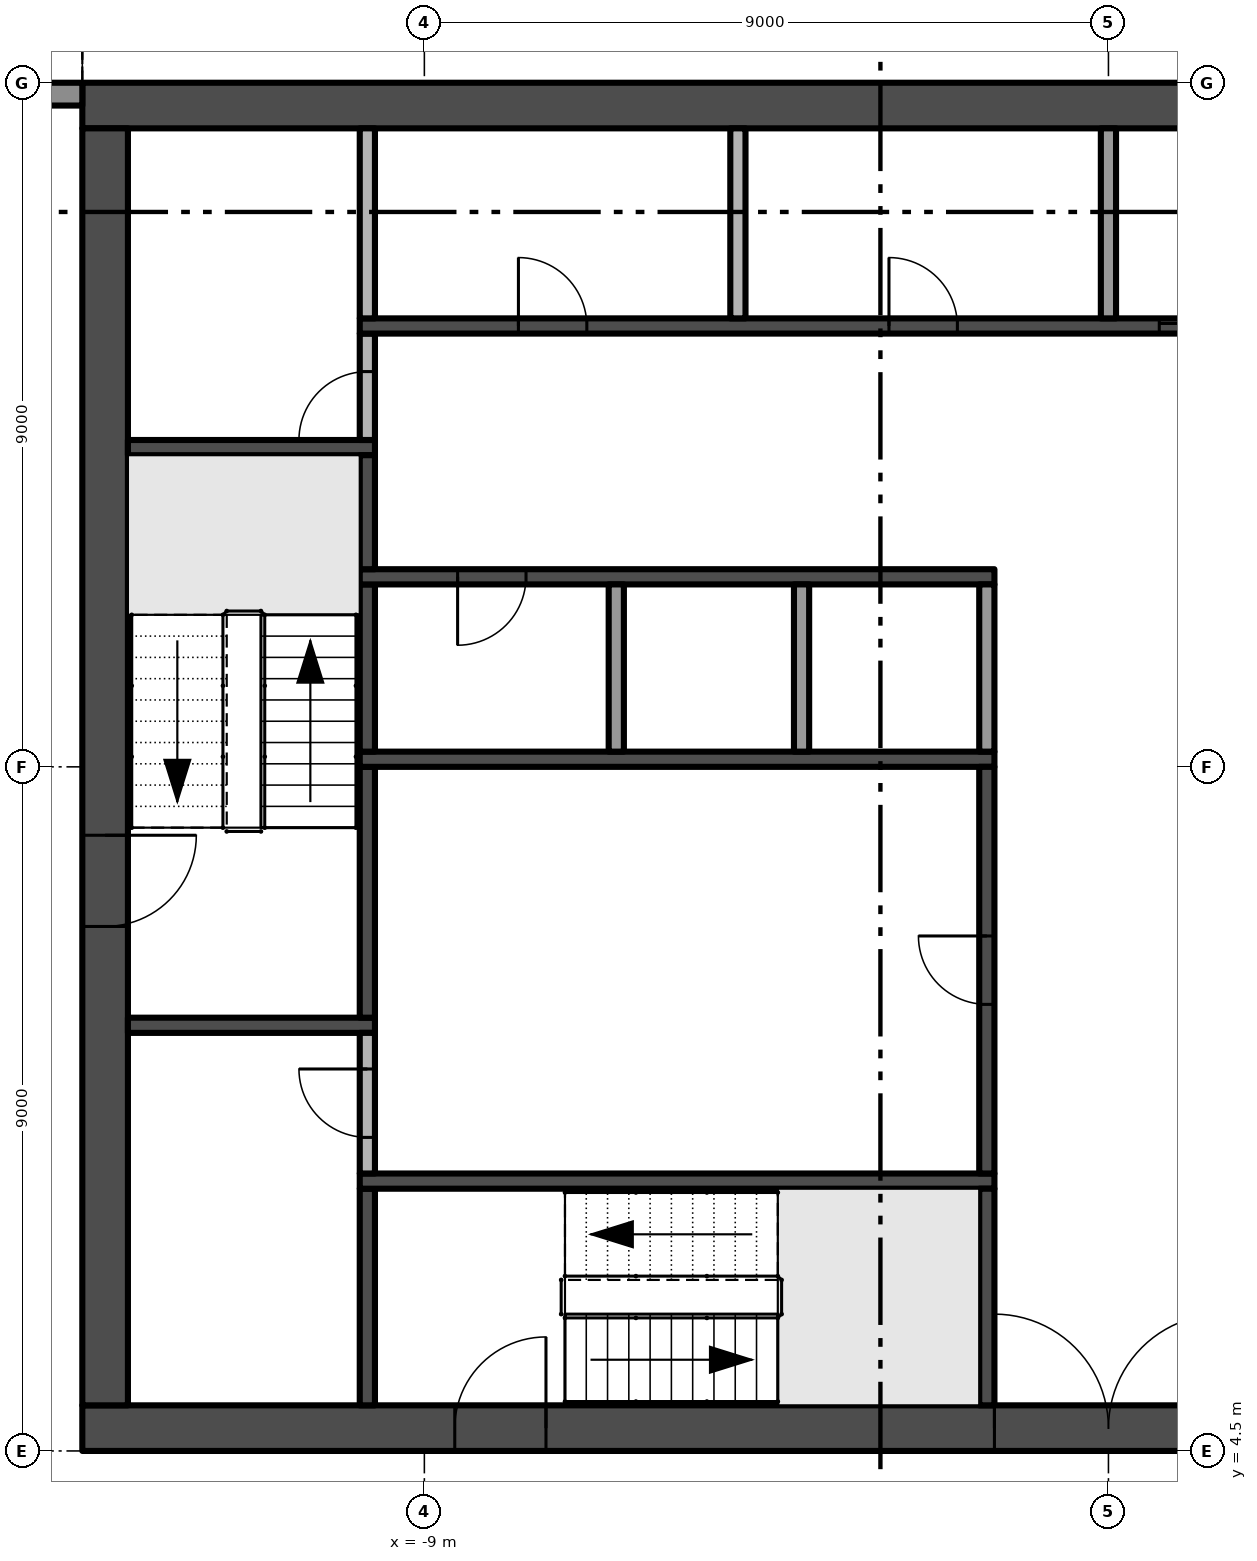
"""IFC4 building model, lengths in metres.
Left out: names, types, materials, properties, quantities, classifications, styles, units other than length and angle.
Written with IfcOpenShell. Run it as: python <this file> out.ifc"""

import sys

from ifc_helpers import new_model, si_unit, direction, frame, frame_2d, origin, place, context, subcontext, project, spatial, polyline, rectangle, outline, extrude, element, fill, save


model = new_model("IFC4")
c1 = context("Model", 3, precision=1e-05, world=origin(), true_north=direction((0.0, 1.0)))
c2 = subcontext(c1, "Body", "Model", "MODEL_VIEW")
j1 = project(units=[si_unit("LENGTHUNIT", "METRE"), si_unit("PLANEANGLEUNIT", "RADIAN")], contexts=[c1])
p1 = place(None, origin())
s1 = spatial("IfcSite", under=j1, at=p1, CompositionType="ELEMENT")
p2 = place(p1, origin())
s2 = spatial("IfcBuilding", under=s1, at=p2, CompositionType="ELEMENT")
p3 = place(p2, frame((0.0, 0.0, 195.8)))
s3 = spatial("IfcBuildingStorey", under=s2, at=p3, CompositionType="ELEMENT", Elevation=195.8)
p4 = place(p3, frame((-13.5, 4.8, -0.3), z_axis=(0.0, 0.0, 1.0), x_axis=(1.0, 0.0, 0.0)))
e1 = element("IfcWall", 1, at=p4, inside=s3, PredefinedType="SHEAR", context=c2, shape_type="SweptSolid", body=[
    extrude(rectangle(XDim=27.0, YDim=0.6, at=frame_2d((13.5, 0.0))), origin(), (0.0, 0.0, 1.0), 3.8),
])
p5 = place(p4, frame((12.0, 0.0, 0.3)))
e2 = element("IfcOpeningElement", 2, at=p5, cuts=e1, PredefinedType="OPENING", context=c2, shape_type="SweptSolid", body=[
    extrude(rectangle(XDim=3.0, YDim=2.4, at=frame_2d((1.5, 1.2))), frame((0.0, 0.31, 0.0), z_axis=(0.0, -1.0, 0.0), x_axis=(1.0, 0.0, 0.0)), (0.0, 0.0, 1.0), 0.62),
])
p6 = place(p4, frame((4.9, 0.0, 0.3)))
e3 = element("IfcOpeningElement", 3, at=p6, cuts=e1, PredefinedType="OPENING", context=c2, shape_type="SweptSolid", body=[
    extrude(rectangle(XDim=1.2, YDim=2.2, at=frame_2d((0.6, 1.1))), frame((0.0, 0.31, 0.0), z_axis=(0.0, -1.0, 0.0), x_axis=(1.0, 0.0, 0.0)), (0.0, 0.0, 1.0), 0.62),
])
p7 = place(p4, frame((20.75, 0.0, 0.3)))
e4 = element("IfcOpeningElement", 4, at=p7, cuts=e1, PredefinedType="OPENING", context=c2, shape_type="SweptSolid", body=[
    extrude(rectangle(XDim=1.5, YDim=2.2, at=frame_2d((0.75, 1.1))), frame((0.0, 0.31, 0.0), z_axis=(0.0, -1.0, 0.0), x_axis=(1.0, 0.0, 0.0)), (0.0, 0.0, 1.0), 0.62),
])
p8 = place(p4, frame((17.4, 0.0, 0.3)))
e5 = element("IfcOpeningElement", 5, at=p8, cuts=e1, PredefinedType="OPENING", context=c2, shape_type="SweptSolid", body=[
    extrude(rectangle(XDim=1.2, YDim=2.2, at=frame_2d((0.6, 1.1))), frame((0.0, 0.31, 0.0), z_axis=(0.0, -1.0, 0.0), x_axis=(1.0, 0.0, 0.0)), (0.0, 0.0, 1.0), 0.62),
])
p9 = place(p3, frame((13.5, 22.2, -0.3), z_axis=(0.0, 0.0, 1.0), x_axis=(-1.0, 0.0, 0.0)))
e6 = element("IfcWall", 6, at=p9, inside=s3, PredefinedType="SHEAR", context=c2, shape_type="SweptSolid", body=[
    extrude(rectangle(XDim=27.0, YDim=0.6, at=frame_2d((13.5, 0.0))), origin(), (0.0, 0.0, 1.0), 3.8),
])
p10 = place(p3, frame((-13.2, 21.9, -0.3), z_axis=(0.0, 0.0, 1.0), x_axis=(0.0, -1.0, 0.0)))
e7 = element("IfcWall", 7, at=p10, inside=s3, PredefinedType="SHEAR", context=c2, shape_type="SweptSolid", body=[
    extrude(rectangle(XDim=16.8, YDim=0.6, at=frame_2d((8.4, 0.0))), origin(), (0.0, 0.0, 1.0), 3.8),
])
p11 = place(p10, frame((9.3, 0.0, 0.3)))
e8 = element("IfcOpeningElement", 8, at=p11, cuts=e7, PredefinedType="OPENING", context=c2, shape_type="SweptSolid", body=[
    extrude(rectangle(XDim=1.2, YDim=2.2, at=frame_2d((0.6, 1.1))), frame((0.0, 0.31, 0.0), z_axis=(0.0, -1.0, 0.0), x_axis=(1.0, 0.0, 0.0)), (0.0, 0.0, 1.0), 0.62),
])
p12 = place(p3, frame((-17.475, 22.35, 0.0), z_axis=(0.0, 0.0, 1.0), x_axis=(1.0, 0.0, 0.0)))
e9 = element("IfcWall", 9, at=p12, inside=s3, PredefinedType="SOLIDWALL", context=c2, shape_type="SweptSolid", body=[
    extrude(rectangle(XDim=3.975, YDim=0.3, at=frame_2d((1.988, 0.0))), origin(), (0.0, 0.0, 1.0), 3.5),
])
p13 = place(p12, frame((0.325, 0.0, 0.45)))
e10 = element("IfcOpeningElement", 10, at=p13, cuts=e9, PredefinedType="OPENING", context=c2, shape_type="SweptSolid", body=[
    extrude(rectangle(XDim=3.025, YDim=2.65, at=frame_2d((1.512, 1.325))), frame((0.0, 0.16, 0.0), z_axis=(0.0, -1.0, 0.0), x_axis=(1.0, 0.0, 0.0)), (0.0, 0.0, 1.0), 0.32),
])
p14 = place(p3, origin())
e11 = element("IfcWall", 11, at=p14, inside=s3, PredefinedType="USERDEFINED", context=c2, shape_type="SweptSolid", body=[
    extrude(outline(polyline([(-13.5, 24.3), (-15.0, 23.595), (-16.5, 23.159), (-17.25, 23.1), (-18.0, 23.159), (-19.5, 23.595), (-21.0, 24.3), (-22.5, 25.005), (-22.606, 24.779), (-21.106, 24.074), (-19.589, 23.36), (-18.045, 22.911), (-17.25, 22.849), (-16.455, 22.911), (-14.911, 23.36), (-13.394, 24.074), (-13.5, 24.3)])), origin(), (0.0, 0.0, 1.0), 0.9),
])
for number, where, z_axis, x_axis in (
    (12, (-12.9, 10.1, 0.0), (0.0, 0.0, 1.0), (1.0, 0.0, 0.0)),
    (13, (-12.9, 17.7, 0.0), (0.0, 0.0, 1.0), (1.0, 0.0, 0.0)),
):
    element("IfcWall", number, at=place(p3, frame(where, z_axis=z_axis, x_axis=x_axis)), inside=s3, PredefinedType="SHEAR", context=c2, shape_type="SweptSolid", body=[
        extrude(rectangle(XDim=3.25, YDim=0.2, at=frame_2d((1.625, 0.0))), origin(), (0.0, 0.0, 1.0), 3.5),
    ])
p15 = place(p3, frame((-9.75, 5.1, 0.0), z_axis=(0.0, 0.0, 1.0), x_axis=(0.0, 1.0, 0.0)))
e14 = element("IfcWall", 14, at=p15, inside=s3, PredefinedType="SHEAR", context=c2, shape_type="SweptSolid", body=[
    extrude(rectangle(XDim=2.85, YDim=0.2, at=frame_2d((1.425, 0.0))), origin(), (0.0, 0.0, 1.0), 3.5),
])
p16 = place(p3, frame((-9.85, 8.05, 0.0), z_axis=(0.0, 0.0, 1.0), x_axis=(1.0, 0.0, 0.0)))
e15 = element("IfcWall", 15, at=p16, inside=s3, PredefinedType="SHEAR", context=c2, shape_type="SweptSolid", body=[
    extrude(rectangle(XDim=8.35, YDim=0.2, at=frame_2d((4.175, 0.0))), origin(), (0.0, 0.0, 1.0), 3.5),
])
p17 = place(p3, frame((-9.75, 8.15, 0.0), z_axis=(0.0, 0.0, 1.0), x_axis=(0.0, 1.0, 0.0)))
e16 = element("IfcWall", 16, at=p17, inside=s3, PredefinedType="PARTITIONING", context=c2, shape_type="SweptSolid", body=[
    extrude(rectangle(XDim=1.85, YDim=0.2, at=frame_2d((0.925, 0.0))), origin(), (0.0, 0.0, 1.0), 3.5),
])
p18 = place(p17, frame((0.475, 0.0, 0.0)))
e17 = element("IfcOpeningElement", 17, at=p18, cuts=e16, PredefinedType="OPENING", context=c2, shape_type="SweptSolid", body=[
    extrude(rectangle(XDim=0.9, YDim=2.1, at=frame_2d((0.45, 1.05))), frame((0.0, 0.11, 0.0), z_axis=(0.0, -1.0, 0.0), x_axis=(1.0, 0.0, 0.0)), (0.0, 0.0, 1.0), 0.22),
])
p19 = place(p3, frame((-9.75, 10.2, 0.0), z_axis=(0.0, 0.0, 1.0), x_axis=(0.0, 1.0, 0.0)))
e18 = element("IfcWall", 18, at=p19, inside=s3, PredefinedType="SHEAR", context=c2, shape_type="SweptSolid", body=[
    extrude(rectangle(XDim=3.3, YDim=0.2, at=frame_2d((1.65, 0.0))), origin(), (0.0, 0.0, 1.0), 3.5),
])
p20 = place(p3, frame((-9.85, 13.6, 0.0), z_axis=(0.0, 0.0, 1.0), x_axis=(1.0, 0.0, 0.0)))
e19 = element("IfcWall", 19, at=p20, inside=s3, PredefinedType="SHEAR", context=c2, shape_type="SweptSolid", body=[
    extrude(rectangle(XDim=8.35, YDim=0.2, at=frame_2d((4.175, 0.0))), origin(), (0.0, 0.0, 1.0), 3.5),
])
p21 = place(p3, frame((-9.75, 13.7, 0.0), z_axis=(0.0, 0.0, 1.0), x_axis=(0.0, 1.0, 0.0)))
e20 = element("IfcWall", 20, at=p21, inside=s3, PredefinedType="SHEAR", context=c2, shape_type="SweptSolid", body=[
    extrude(rectangle(XDim=2.2, YDim=0.2, at=frame_2d((1.1, 0.0))), origin(), (0.0, 0.0, 1.0), 3.5),
])
p22 = place(p3, frame((-1.5, 16.0, 0.0), z_axis=(0.0, 0.0, 1.0), x_axis=(-1.0, 0.0, 0.0)))
e21 = element("IfcWall", 21, at=p22, inside=s3, PredefinedType="SHEAR", context=c2, shape_type="SweptSolid", body=[
    extrude(rectangle(XDim=8.35, YDim=0.2, at=frame_2d((4.175, 0.0))), origin(), (0.0, 0.0, 1.0), 3.5),
])
p23 = place(p22, frame((6.162, 0.0, 0.0)))
e22 = element("IfcOpeningElement", 22, at=p23, cuts=e21, PredefinedType="OPENING", context=c2, shape_type="SweptSolid", body=[
    extrude(rectangle(XDim=0.9, YDim=2.1, at=frame_2d((0.45, 1.05))), frame((0.0, 0.11, 0.0), z_axis=(0.0, -1.0, 0.0), x_axis=(1.0, 0.0, 0.0)), (0.0, 0.0, 1.0), 0.22),
])
p24 = place(p3, frame((-9.75, 16.1, 0.0), z_axis=(0.0, 0.0, 1.0), x_axis=(0.0, 1.0, 0.0)))
e23 = element("IfcWall", 23, at=p24, inside=s3, PredefinedType="SHEAR", context=c2, shape_type="SweptSolid", body=[
    extrude(rectangle(XDim=1.5, YDim=0.2, at=frame_2d((0.75, 0.0))), origin(), (0.0, 0.0, 1.0), 3.5),
])
p25 = place(p3, frame((-9.75, 17.8, 0.0), z_axis=(0.0, 0.0, 1.0), x_axis=(0.0, 1.0, 0.0)))
e24 = element("IfcWall", 24, at=p25, inside=s3, PredefinedType="PARTITIONING", context=c2, shape_type="SweptSolid", body=[
    extrude(rectangle(XDim=1.4, YDim=0.2, at=frame_2d((0.7, 0.0))), origin(), (0.0, 0.0, 1.0), 3.5),
])
p26 = place(p25, origin())
e25 = element("IfcOpeningElement", 25, at=p26, cuts=e24, PredefinedType="OPENING", context=c2, shape_type="SweptSolid", body=[
    extrude(rectangle(XDim=0.9, YDim=2.1, at=frame_2d((0.45, 1.05))), frame((0.0, 0.11, 0.0), z_axis=(0.0, -1.0, 0.0), x_axis=(1.0, 0.0, 0.0)), (0.0, 0.0, 1.0), 0.22),
])
p27 = place(p3, frame((-9.85, 19.3, 0.0), z_axis=(0.0, 0.0, 1.0), x_axis=(1.0, 0.0, 0.0)))
e26 = element("IfcWall", 26, at=p27, inside=s3, PredefinedType="SHEAR", context=c2, shape_type="SweptSolid", body=[
    extrude(rectangle(XDim=19.7, YDim=0.2, at=frame_2d((9.85, 0.0))), origin(), (0.0, 0.0, 1.0), 3.5),
])
p28 = place(p27, frame((10.519, 0.0, 0.0)))
e27 = element("IfcOpeningElement", 27, at=p28, cuts=e26, PredefinedType="OPENING", context=c2, shape_type="SweptSolid", body=[
    extrude(rectangle(XDim=1.1, YDim=2.1, at=frame_2d((0.55, 1.05))), frame((0.0, 0.11, 0.0), z_axis=(0.0, -1.0, 0.0), x_axis=(1.0, 0.0, 0.0)), (0.0, 0.0, 1.0), 0.22),
])
p29 = place(p27, frame((12.956, 0.0, 0.0)))
e28 = element("IfcOpeningElement", 28, at=p29, cuts=e26, PredefinedType="OPENING", context=c2, shape_type="SweptSolid", body=[
    extrude(rectangle(XDim=1.1, YDim=2.1, at=frame_2d((0.55, 1.05))), frame((0.0, 0.11, 0.0), z_axis=(0.0, -1.0, 0.0), x_axis=(1.0, 0.0, 0.0)), (0.0, 0.0, 1.0), 0.22),
])
p30 = place(p27, frame((15.394, 0.0, 0.0)))
e29 = element("IfcOpeningElement", 29, at=p30, cuts=e26, PredefinedType="OPENING", context=c2, shape_type="SweptSolid", body=[
    extrude(rectangle(XDim=1.1, YDim=2.1, at=frame_2d((0.55, 1.05))), frame((0.0, 0.11, 0.0), z_axis=(0.0, -1.0, 0.0), x_axis=(1.0, 0.0, 0.0)), (0.0, 0.0, 1.0), 0.22),
])
p31 = place(p27, frame((17.831, 0.0, 0.0)))
e30 = element("IfcOpeningElement", 30, at=p31, cuts=e26, PredefinedType="OPENING", context=c2, shape_type="SweptSolid", body=[
    extrude(rectangle(XDim=1.1, YDim=2.1, at=frame_2d((0.55, 1.05))), frame((0.0, 0.11, 0.0), z_axis=(0.0, -1.0, 0.0), x_axis=(1.0, 0.0, 0.0)), (0.0, 0.0, 1.0), 0.22),
])
p32 = place(p27, frame((2.087, 0.0, 0.0)))
e31 = element("IfcOpeningElement", 31, at=p32, cuts=e26, PredefinedType="OPENING", context=c2, shape_type="SweptSolid", body=[
    extrude(rectangle(XDim=0.9, YDim=2.1, at=frame_2d((0.45, 1.05))), frame((0.0, 0.11, 0.0), z_axis=(0.0, -1.0, 0.0), x_axis=(1.0, 0.0, 0.0)), (0.0, 0.0, 1.0), 0.22),
])
p33 = place(p27, frame((6.963, 0.0, 0.0)))
e32 = element("IfcOpeningElement", 32, at=p33, cuts=e26, PredefinedType="OPENING", context=c2, shape_type="SweptSolid", body=[
    extrude(rectangle(XDim=0.9, YDim=2.1, at=frame_2d((0.45, 1.05))), frame((0.0, 0.11, 0.0), z_axis=(0.0, -1.0, 0.0), x_axis=(1.0, 0.0, 0.0)), (0.0, 0.0, 1.0), 0.22),
])
p34 = place(p3, frame((-9.75, 19.4, 0.0), z_axis=(0.0, 0.0, 1.0), x_axis=(0.0, 1.0, 0.0)))
e33 = element("IfcWall", 33, at=p34, inside=s3, PredefinedType="PARTITIONING", context=c2, shape_type="SweptSolid", body=[
    extrude(rectangle(XDim=2.5, YDim=0.2, at=frame_2d((1.25, 0.0))), origin(), (0.0, 0.0, 1.0), 3.5),
])
p35 = place(p3, frame((-6.475, 13.7, 0.0), z_axis=(0.0, 0.0, 1.0), x_axis=(0.0, 1.0, 0.0)))
e34 = element("IfcWall", 34, at=p35, inside=s3, PredefinedType="PARTITIONING", context=c2, shape_type="SweptSolid", body=[
    extrude(rectangle(XDim=2.2, YDim=0.2, at=frame_2d((1.1, 0.0))), origin(), (0.0, 0.0, 1.0), 3.5),
])
p36 = place(p3, frame((-4.875, 19.4, 0.0), z_axis=(0.0, 0.0, 1.0), x_axis=(0.0, 1.0, 0.0)))
e35 = element("IfcWall", 35, at=p36, inside=s3, PredefinedType="PARTITIONING", context=c2, shape_type="SweptSolid", body=[
    extrude(rectangle(XDim=2.5, YDim=0.2, at=frame_2d((1.25, 0.0))), origin(), (0.0, 0.0, 1.0), 3.5),
])
p37 = place(p3, frame((-4.037, 13.7, 0.0), z_axis=(0.0, 0.0, 1.0), x_axis=(0.0, 1.0, 0.0)))
e36 = element("IfcWall", 36, at=p37, inside=s3, PredefinedType="PARTITIONING", context=c2, shape_type="SweptSolid", body=[
    extrude(rectangle(XDim=2.2, YDim=0.2, at=frame_2d((1.1, 0.0))), origin(), (0.0, 0.0, 1.0), 3.5),
])
p38 = place(p3, frame((-1.6, 5.1, 0.0), z_axis=(0.0, 0.0, 1.0), x_axis=(0.0, 1.0, 0.0)))
e37 = element("IfcWall", 37, at=p38, inside=s3, PredefinedType="SHEAR", context=c2, shape_type="SweptSolid", body=[
    extrude(rectangle(XDim=2.85, YDim=0.2, at=frame_2d((1.425, 0.0))), origin(), (0.0, 0.0, 1.0), 3.5),
])
p39 = place(p3, frame((-1.6, 8.15, 0.0), z_axis=(0.0, 0.0, 1.0), x_axis=(0.0, 1.0, 0.0)))
e38 = element("IfcWall", 38, at=p39, inside=s3, PredefinedType="SHEAR", context=c2, shape_type="SweptSolid", body=[
    extrude(rectangle(XDim=5.35, YDim=0.2, at=frame_2d((2.675, 0.0))), origin(), (0.0, 0.0, 1.0), 3.5),
])
p40 = place(p39, frame((2.225, 0.0, 0.0)))
e39 = element("IfcOpeningElement", 39, at=p40, cuts=e38, PredefinedType="OPENING", context=c2, shape_type="SweptSolid", body=[
    extrude(rectangle(XDim=0.9, YDim=2.1, at=frame_2d((0.45, 1.05))), frame((0.0, 0.11, 0.0), z_axis=(0.0, -1.0, 0.0), x_axis=(1.0, 0.0, 0.0)), (0.0, 0.0, 1.0), 0.22),
])
p41 = place(p3, frame((-1.6, 13.7, 0.0), z_axis=(0.0, 0.0, 1.0), x_axis=(0.0, 1.0, 0.0)))
e40 = element("IfcWall", 40, at=p41, inside=s3, PredefinedType="PARTITIONING", context=c2, shape_type="SweptSolid", body=[
    extrude(rectangle(XDim=2.2, YDim=0.2, at=frame_2d((1.1, 0.0))), origin(), (0.0, 0.0, 1.0), 3.5),
])
p42 = place(p3, frame((0.0, 19.4, 0.0), z_axis=(0.0, 0.0, 1.0), x_axis=(0.0, 1.0, 0.0)))
e41 = element("IfcWall", 41, at=p42, inside=s3, PredefinedType="PARTITIONING", context=c2, shape_type="SweptSolid", body=[
    extrude(rectangle(XDim=2.5, YDim=0.2, at=frame_2d((1.25, 0.0))), origin(), (0.0, 0.0, 1.0), 3.5),
])
p43 = place(p5, frame((3.0, 0.0, 0.0), z_axis=(0.0, 0.0, 1.0), x_axis=(-1.0, 0.0, 0.0)))
e42 = element("IfcDoor", 42, at=p43, inside=s3, OperationType="DOUBLE_DOOR_SINGLE_SWING", PredefinedType="DOOR", context=c2, shape_type="SweptSolid", body=[
    extrude(rectangle(XDim=3.0, YDim=2.4, at=frame_2d((1.5, 1.2))), frame((0.0, 0.025, 0.0), z_axis=(0.0, -1.0, 0.0), x_axis=(1.0, 0.0, 0.0)), (0.0, 0.0, 1.0), 0.05),
])
fill(e2, e42)
p44 = place(p11, frame((1.2, 0.0, 0.0), z_axis=(0.0, 0.0, 1.0), x_axis=(-1.0, 0.0, 0.0)))
e43 = element("IfcDoor", 43, at=p44, inside=s3, OperationType="SINGLE_SWING_RIGHT", PredefinedType="DOOR", context=c2, shape_type="SweptSolid", body=[
    extrude(rectangle(XDim=1.2, YDim=2.2, at=frame_2d((0.6, 1.1))), frame((0.0, 0.025, 0.0), z_axis=(0.0, -1.0, 0.0), x_axis=(1.0, 0.0, 0.0)), (0.0, 0.0, 1.0), 0.05),
])
fill(e8, e43)
p45 = place(p6, frame((1.2, 0.0, 0.0), z_axis=(0.0, 0.0, 1.0), x_axis=(-1.0, 0.0, 0.0)))
e44 = element("IfcDoor", 44, at=p45, inside=s3, OperationType="SINGLE_SWING_LEFT", PredefinedType="DOOR", context=c2, shape_type="SweptSolid", body=[
    extrude(rectangle(XDim=1.2, YDim=2.2, at=frame_2d((0.6, 1.1))), frame((0.0, 0.025, 0.0), z_axis=(0.0, -1.0, 0.0), x_axis=(1.0, 0.0, 0.0)), (0.0, 0.0, 1.0), 0.05),
])
fill(e3, e44)
p46 = place(p28, origin())
e45 = element("IfcDoor", 45, at=p46, inside=s3, OperationType="SLIDING_TO_RIGHT", PredefinedType="DOOR", context=c2, shape_type="SweptSolid", body=[
    extrude(rectangle(XDim=1.1, YDim=2.1, at=frame_2d((0.55, 1.05))), frame((0.0, 0.025, 0.0), z_axis=(0.0, -1.0, 0.0), x_axis=(1.0, 0.0, 0.0)), (0.0, 0.0, 1.0), 0.05),
])
fill(e27, e45)
p47 = place(p40, origin())
e46 = element("IfcDoor", 46, at=p47, inside=s3, OperationType="SINGLE_SWING_RIGHT", PredefinedType="DOOR", context=c2, shape_type="SweptSolid", body=[
    extrude(rectangle(XDim=0.9, YDim=2.1, at=frame_2d((0.45, 1.05))), frame((0.0, 0.025, 0.0), z_axis=(0.0, -1.0, 0.0), x_axis=(1.0, 0.0, 0.0)), (0.0, 0.0, 1.0), 0.05),
])
fill(e39, e46)
p48 = place(p23, origin())
e47 = element("IfcDoor", 47, at=p48, inside=s3, OperationType="SINGLE_SWING_RIGHT", PredefinedType="DOOR", context=c2, shape_type="SweptSolid", body=[
    extrude(rectangle(XDim=0.9, YDim=2.1, at=frame_2d((0.45, 1.05))), frame((0.0, 0.025, 0.0), z_axis=(0.0, -1.0, 0.0), x_axis=(1.0, 0.0, 0.0)), (0.0, 0.0, 1.0), 0.05),
])
fill(e22, e47)
p49 = place(p26, origin())
e48 = element("IfcDoor", 48, at=p49, inside=s3, OperationType="SINGLE_SWING_LEFT", PredefinedType="DOOR", context=c2, shape_type="SweptSolid", body=[
    extrude(rectangle(XDim=0.9, YDim=2.1, at=frame_2d((0.45, 1.05))), frame((0.0, 0.025, 0.0), z_axis=(0.0, -1.0, 0.0), x_axis=(1.0, 0.0, 0.0)), (0.0, 0.0, 1.0), 0.05),
])
fill(e25, e48)
p50 = place(p32, origin())
e49 = element("IfcDoor", 49, at=p50, inside=s3, OperationType="SINGLE_SWING_LEFT", PredefinedType="DOOR", context=c2, shape_type="SweptSolid", body=[
    extrude(rectangle(XDim=0.9, YDim=2.1, at=frame_2d((0.45, 1.05))), frame((0.0, 0.025, 0.0), z_axis=(0.0, -1.0, 0.0), x_axis=(1.0, 0.0, 0.0)), (0.0, 0.0, 1.0), 0.05),
])
fill(e31, e49)
p51 = place(p33, origin())
e50 = element("IfcDoor", 50, at=p51, inside=s3, OperationType="SINGLE_SWING_LEFT", PredefinedType="DOOR", context=c2, shape_type="SweptSolid", body=[
    extrude(rectangle(XDim=0.9, YDim=2.1, at=frame_2d((0.45, 1.05))), frame((0.0, 0.025, 0.0), z_axis=(0.0, -1.0, 0.0), x_axis=(1.0, 0.0, 0.0)), (0.0, 0.0, 1.0), 0.05),
])
fill(e32, e50)
p52 = place(p18, origin())
e51 = element("IfcDoor", 51, at=p52, inside=s3, OperationType="SINGLE_SWING_RIGHT", PredefinedType="DOOR", context=c2, shape_type="SweptSolid", body=[
    extrude(rectangle(XDim=0.9, YDim=2.1, at=frame_2d((0.45, 1.05))), frame((0.0, 0.025, 0.0), z_axis=(0.0, -1.0, 0.0), x_axis=(1.0, 0.0, 0.0)), (0.0, 0.0, 1.0), 0.05),
])
fill(e17, e51)
save(model, sys.argv[1])
